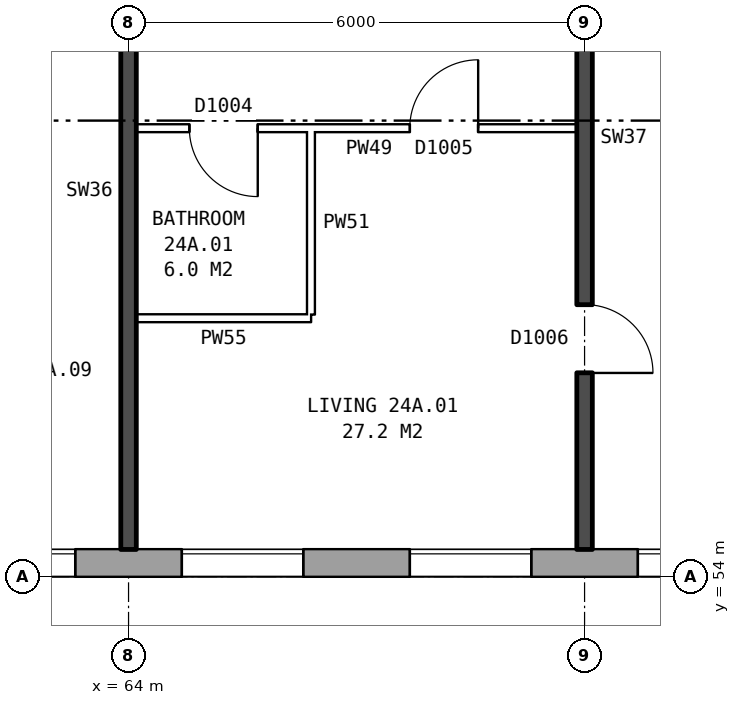
"""IFC4 building model, lengths in metres.
Left out: names, types, materials, properties, quantities, classifications, styles, units other than length and angle.
Written with IfcOpenShell. Run it as: python <this file> out.ifc"""

import sys

from ifc_helpers import new_model, si_unit, direction, frame, frame_2d, origin, place, context, subcontext, project, spatial, rectangle, extrude, element, fill, save


model = new_model("IFC4")
c1 = context("Model", 3, precision=1e-05, world=origin(), true_north=direction((0.0, 1.0)))
c2 = subcontext(c1, "Body", "Model", "MODEL_VIEW")
j1 = project(units=[si_unit("LENGTHUNIT", "METRE"), si_unit("PLANEANGLEUNIT", "RADIAN")], contexts=[c1])
p1 = place(None, origin())
s1 = spatial("IfcSite", under=j1, at=p1, CompositionType="ELEMENT")
p2 = place(p1, origin())
s2 = spatial("IfcBuilding", under=s1, at=p2, CompositionType="ELEMENT")
p3 = place(p2, frame((0.0, 0.0, 87.1)))
s3 = spatial("IfcBuildingStorey", under=s2, at=p3, CompositionType="ELEMENT", Elevation=87.1)
p4 = place(p3, frame((26.325, 54.18, 0.0), z_axis=(0.0, 0.0, 1.0), x_axis=(1.0, 0.0, 0.0)))
e1 = element("IfcWall", 1, at=p4, inside=s3, PredefinedType="STANDARD", context=c2, shape_type="SweptSolid", body=[
    extrude(rectangle(XDim=46.601, YDim=0.36, at=frame_2d((23.3, 0.0))), origin(), (0.0, 0.0, 1.0), 2.85),
])
p5 = place(p4, frame((2.375, 0.0, 0.8)))
e2 = element("IfcOpeningElement", 2, at=p5, cuts=e1, PredefinedType="OPENING", context=c2, shape_type="SweptSolid", body=[
    extrude(rectangle(XDim=1.6, YDim=1.8, at=frame_2d((0.8, 0.9))), frame((0.0, 0.19, 0.0), z_axis=(0.0, -1.0, 0.0), x_axis=(1.0, 0.0, 0.0)), (0.0, 0.0, 1.0), 0.38),
])
p6 = place(p4, frame((5.375, 0.0, 0.8)))
e3 = element("IfcOpeningElement", 3, at=p6, cuts=e1, PredefinedType="OPENING", context=c2, shape_type="SweptSolid", body=[
    extrude(rectangle(XDim=1.6, YDim=1.8, at=frame_2d((0.8, 0.9))), frame((0.0, 0.19, 0.0), z_axis=(0.0, -1.0, 0.0), x_axis=(1.0, 0.0, 0.0)), (0.0, 0.0, 1.0), 0.38),
])
p7 = place(p4, frame((8.375, 0.0, 0.8)))
e4 = element("IfcOpeningElement", 4, at=p7, cuts=e1, PredefinedType="OPENING", context=c2, shape_type="SweptSolid", body=[
    extrude(rectangle(XDim=1.6, YDim=1.8, at=frame_2d((0.8, 0.9))), frame((0.0, 0.19, 0.0), z_axis=(0.0, -1.0, 0.0), x_axis=(1.0, 0.0, 0.0)), (0.0, 0.0, 1.0), 0.38),
])
p8 = place(p4, frame((11.375, 0.0, 0.8)))
e5 = element("IfcOpeningElement", 5, at=p8, cuts=e1, PredefinedType="OPENING", context=c2, shape_type="SweptSolid", body=[
    extrude(rectangle(XDim=1.6, YDim=1.8, at=frame_2d((0.8, 0.9))), frame((0.0, 0.19, 0.0), z_axis=(0.0, -1.0, 0.0), x_axis=(1.0, 0.0, 0.0)), (0.0, 0.0, 1.0), 0.38),
])
p9 = place(p4, frame((14.375, 0.0, 0.8)))
e6 = element("IfcOpeningElement", 6, at=p9, cuts=e1, PredefinedType="OPENING", context=c2, shape_type="SweptSolid", body=[
    extrude(rectangle(XDim=1.6, YDim=1.8, at=frame_2d((0.8, 0.9))), frame((0.0, 0.19, 0.0), z_axis=(0.0, -1.0, 0.0), x_axis=(1.0, 0.0, 0.0)), (0.0, 0.0, 1.0), 0.38),
])
p10 = place(p4, frame((17.375, 0.0, 0.8)))
e7 = element("IfcOpeningElement", 7, at=p10, cuts=e1, PredefinedType="OPENING", context=c2, shape_type="SweptSolid", body=[
    extrude(rectangle(XDim=1.6, YDim=1.8, at=frame_2d((0.8, 0.9))), frame((0.0, 0.19, 0.0), z_axis=(0.0, -1.0, 0.0), x_axis=(1.0, 0.0, 0.0)), (0.0, 0.0, 1.0), 0.38),
])
p11 = place(p4, frame((19.875, 0.0, 1.4)))
e8 = element("IfcOpeningElement", 8, at=p11, cuts=e1, PredefinedType="OPENING", context=c2, shape_type="SweptSolid", body=[
    extrude(rectangle(XDim=1.2, YDim=1.2, at=frame_2d((0.6, 0.6))), frame((0.0, 0.19, 0.0), z_axis=(0.0, -1.0, 0.0), x_axis=(1.0, 0.0, 0.0)), (0.0, 0.0, 1.0), 0.38),
])
p12 = place(p4, frame((22.825, 0.0, 0.25)))
e9 = element("IfcOpeningElement", 9, at=p12, cuts=e1, PredefinedType="OPENING", context=c2, shape_type="SweptSolid", body=[
    extrude(rectangle(XDim=0.8, YDim=1.5, at=frame_2d((0.4, 0.75))), frame((0.0, 0.19, 0.0), z_axis=(0.0, -1.0, 0.0), x_axis=(1.0, 0.0, 0.0)), (0.0, 0.0, 1.0), 0.38),
])
p13 = place(p4, frame((26.375, 0.0, 0.8)))
e10 = element("IfcOpeningElement", 10, at=p13, cuts=e1, PredefinedType="OPENING", context=c2, shape_type="SweptSolid", body=[
    extrude(rectangle(XDim=1.6, YDim=1.8, at=frame_2d((0.8, 0.9))), frame((0.0, 0.19, 0.0), z_axis=(0.0, -1.0, 0.0), x_axis=(1.0, 0.0, 0.0)), (0.0, 0.0, 1.0), 0.38),
])
p14 = place(p4, frame((29.375, 0.0, 0.8)))
e11 = element("IfcOpeningElement", 11, at=p14, cuts=e1, PredefinedType="OPENING", context=c2, shape_type="SweptSolid", body=[
    extrude(rectangle(XDim=1.6, YDim=1.8, at=frame_2d((0.8, 0.9))), frame((0.0, 0.19, 0.0), z_axis=(0.0, -1.0, 0.0), x_axis=(1.0, 0.0, 0.0)), (0.0, 0.0, 1.0), 0.38),
])
p15 = place(p4, frame((32.375, 0.0, 0.8)))
e12 = element("IfcOpeningElement", 12, at=p15, cuts=e1, PredefinedType="OPENING", context=c2, shape_type="SweptSolid", body=[
    extrude(rectangle(XDim=1.6, YDim=1.8, at=frame_2d((0.8, 0.9))), frame((0.0, 0.19, 0.0), z_axis=(0.0, -1.0, 0.0), x_axis=(1.0, 0.0, 0.0)), (0.0, 0.0, 1.0), 0.38),
])
p16 = place(p4, frame((35.375, 0.0, 0.8)))
e13 = element("IfcOpeningElement", 13, at=p16, cuts=e1, PredefinedType="OPENING", context=c2, shape_type="SweptSolid", body=[
    extrude(rectangle(XDim=1.6, YDim=1.8, at=frame_2d((0.8, 0.9))), frame((0.0, 0.19, 0.0), z_axis=(0.0, -1.0, 0.0), x_axis=(1.0, 0.0, 0.0)), (0.0, 0.0, 1.0), 0.38),
])
p17 = place(p4, frame((38.375, 0.0, 0.8)))
e14 = element("IfcOpeningElement", 14, at=p17, cuts=e1, PredefinedType="OPENING", context=c2, shape_type="SweptSolid", body=[
    extrude(rectangle(XDim=1.6, YDim=1.8, at=frame_2d((0.8, 0.9))), frame((0.0, 0.19, 0.0), z_axis=(0.0, -1.0, 0.0), x_axis=(1.0, 0.0, 0.0)), (0.0, 0.0, 1.0), 0.38),
])
p18 = place(p4, frame((41.375, 0.0, 0.8)))
e15 = element("IfcOpeningElement", 15, at=p18, cuts=e1, PredefinedType="OPENING", context=c2, shape_type="SweptSolid", body=[
    extrude(rectangle(XDim=1.6, YDim=1.8, at=frame_2d((0.8, 0.9))), frame((0.0, 0.19, 0.0), z_axis=(0.0, -1.0, 0.0), x_axis=(1.0, 0.0, 0.0)), (0.0, 0.0, 1.0), 0.38),
])
p19 = place(p4, frame((44.375, 0.0, 0.8)))
e16 = element("IfcOpeningElement", 16, at=p19, cuts=e1, PredefinedType="OPENING", context=c2, shape_type="SweptSolid", body=[
    extrude(rectangle(XDim=1.6, YDim=1.8, at=frame_2d((0.8, 0.9))), frame((0.0, 0.19, 0.0), z_axis=(0.0, -1.0, 0.0), x_axis=(1.0, 0.0, 0.0)), (0.0, 0.0, 1.0), 0.38),
])
p20 = place(p4, frame((23.925, 0.0, 0.15)))
e17 = element("IfcOpeningElement", 17, at=p20, cuts=e1, PredefinedType="OPENING", context=c2, shape_type="SweptSolid", body=[
    extrude(rectangle(XDim=0.6, YDim=0.9, at=frame_2d((0.3, 0.45))), frame((0.0, 0.19, 0.0), z_axis=(0.0, -1.0, 0.0), x_axis=(1.0, 0.0, 0.0)), (0.0, 0.0, 1.0), 0.38),
])
p21 = place(p3, frame((64.1, 57.4, 0.0), z_axis=(0.0, 0.0, 1.0), x_axis=(1.0, 0.0, 0.0)))
e18 = element("IfcWall", 18, at=p21, inside=s3, PredefinedType="PARTITIONING", context=c2, shape_type="SweptSolid", body=[
    extrude(rectangle(XDim=2.3, YDim=0.1, at=frame_2d((1.15, 0.0))), origin(), (0.0, 0.0, 1.0), 2.85),
])
p22 = place(p3, frame((64.1, 59.9, 0.0), z_axis=(0.0, 0.0, 1.0), x_axis=(1.0, 0.0, 0.0)))
e19 = element("IfcWall", 19, at=p22, inside=s3, PredefinedType="PARTITIONING", context=c2, shape_type="SweptSolid", body=[
    extrude(rectangle(XDim=5.8, YDim=0.1, at=frame_2d((2.9, 0.0))), origin(), (0.0, 0.0, 1.0), 2.85),
])
p23 = place(p22, frame((3.6, 0.0, 0.0)))
e20 = element("IfcOpeningElement", 20, at=p23, cuts=e19, PredefinedType="OPENING", context=c2, shape_type="SweptSolid", body=[
    extrude(rectangle(XDim=0.9, YDim=2.1, at=frame_2d((0.45, 1.05))), frame((0.0, 0.06, 0.0), z_axis=(0.0, -1.0, 0.0), x_axis=(1.0, 0.0, 0.0)), (0.0, 0.0, 1.0), 0.12),
])
p24 = place(p22, frame((0.7, 0.0, 0.0)))
e21 = element("IfcOpeningElement", 21, at=p24, cuts=e19, PredefinedType="OPENING", context=c2, shape_type="SweptSolid", body=[
    extrude(rectangle(XDim=0.9, YDim=2.1, at=frame_2d((0.45, 1.05))), frame((0.0, 0.06, 0.0), z_axis=(0.0, -1.0, 0.0), x_axis=(1.0, 0.0, 0.0)), (0.0, 0.0, 1.0), 0.12),
])
p25 = place(p3, frame((64.0, 54.36, 0.0), z_axis=(0.0, 0.0, 1.0), x_axis=(0.0, 1.0, 0.0)))
e22 = element("IfcWall", 22, at=p25, inside=s3, PredefinedType="SOLIDWALL", context=c2, shape_type="SweptSolid", body=[
    extrude(rectangle(XDim=9.44, YDim=0.2, at=frame_2d((4.72, 0.0))), origin(), (0.0, 0.0, 1.0), 2.85),
])
p26 = place(p3, frame((66.4, 57.45, 0.0), z_axis=(0.0, 0.0, 1.0), x_axis=(0.0, 1.0, 0.0)))
e23 = element("IfcWall", 23, at=p26, inside=s3, PredefinedType="PARTITIONING", context=c2, shape_type="SweptSolid", body=[
    extrude(rectangle(XDim=2.4, YDim=0.1, at=frame_2d((1.2, 0.0))), origin(), (0.0, 0.0, 1.0), 2.85),
])
p27 = place(p3, frame((70.0, 54.36, 0.0), z_axis=(0.0, 0.0, 1.0), x_axis=(0.0, 1.0, 0.0)))
e24 = element("IfcWall", 24, at=p27, inside=s3, PredefinedType="SOLIDWALL", context=c2, shape_type="SweptSolid", body=[
    extrude(rectangle(XDim=9.44, YDim=0.2, at=frame_2d((4.72, 0.0))), origin(), (0.0, 0.0, 1.0), 2.85),
])
p28 = place(p27, frame((2.32, 0.0, 0.0)))
e25 = element("IfcOpeningElement", 25, at=p28, cuts=e24, PredefinedType="OPENING", context=c2, shape_type="SweptSolid", body=[
    extrude(rectangle(XDim=0.9, YDim=2.1, at=frame_2d((0.45, 1.05))), frame((0.0, 0.11, 0.0), z_axis=(0.0, -1.0, 0.0), x_axis=(1.0, 0.0, 0.0)), (0.0, 0.0, 1.0), 0.22),
])
p29 = place(p27, frame((7.59, 0.0, 0.0)))
e26 = element("IfcOpeningElement", 26, at=p29, cuts=e24, PredefinedType="OPENING", context=c2, shape_type="SweptSolid", body=[
    extrude(rectangle(XDim=0.9, YDim=2.1, at=frame_2d((0.45, 1.05))), frame((0.0, 0.11, 0.0), z_axis=(0.0, -1.0, 0.0), x_axis=(1.0, 0.0, 0.0)), (0.0, 0.0, 1.0), 0.22),
])
p30 = place(p16, origin())
e27 = element("IfcWindow", 27, at=p30, inside=s3, PartitioningType="SINGLE_PANEL", PredefinedType="WINDOW", context=c2, shape_type="SweptSolid", body=[
    extrude(rectangle(XDim=1.6, YDim=1.8, at=frame_2d((0.8, 0.9))), frame((0.0, 0.15, 0.0), z_axis=(0.0, -1.0, 0.0), x_axis=(1.0, 0.0, 0.0)), (0.0, 0.0, 1.0), 0.06),
])
fill(e13, e27)
p31 = place(p17, origin())
e28 = element("IfcWindow", 28, at=p31, inside=s3, PartitioningType="SINGLE_PANEL", PredefinedType="WINDOW", context=c2, shape_type="SweptSolid", body=[
    extrude(rectangle(XDim=1.6, YDim=1.8, at=frame_2d((0.8, 0.9))), frame((0.0, 0.15, 0.0), z_axis=(0.0, -1.0, 0.0), x_axis=(1.0, 0.0, 0.0)), (0.0, 0.0, 1.0), 0.06),
])
fill(e14, e28)
p32 = place(p18, origin())
e29 = element("IfcWindow", 29, at=p32, inside=s3, PartitioningType="SINGLE_PANEL", PredefinedType="WINDOW", context=c2, shape_type="SweptSolid", body=[
    extrude(rectangle(XDim=1.6, YDim=1.8, at=frame_2d((0.8, 0.9))), frame((0.0, 0.15, 0.0), z_axis=(0.0, -1.0, 0.0), x_axis=(1.0, 0.0, 0.0)), (0.0, 0.0, 1.0), 0.06),
])
fill(e15, e29)
p33 = place(p19, origin())
e30 = element("IfcWindow", 30, at=p33, inside=s3, PartitioningType="SINGLE_PANEL", PredefinedType="WINDOW", context=c2, shape_type="SweptSolid", body=[
    extrude(rectangle(XDim=1.6, YDim=1.8, at=frame_2d((0.8, 0.9))), frame((0.0, 0.15, 0.0), z_axis=(0.0, -1.0, 0.0), x_axis=(1.0, 0.0, 0.0)), (0.0, 0.0, 1.0), 0.06),
])
fill(e16, e30)
p34 = place(p28, frame((0.9, 0.0, 0.0), z_axis=(0.0, 0.0, 1.0), x_axis=(-1.0, 0.0, 0.0)))
e31 = element("IfcDoor", 31, at=p34, inside=s3, OperationType="SINGLE_SWING_RIGHT", PredefinedType="DOOR", context=c2, shape_type="SweptSolid", body=[
    extrude(rectangle(XDim=0.9, YDim=2.1, at=frame_2d((0.45, 1.05))), frame((0.0, 0.025, 0.0), z_axis=(0.0, -1.0, 0.0), x_axis=(1.0, 0.0, 0.0)), (0.0, 0.0, 1.0), 0.05),
])
fill(e25, e31)
p35 = place(p23, origin())
e32 = element("IfcDoor", 32, at=p35, inside=s3, OperationType="SINGLE_SWING_RIGHT", PredefinedType="DOOR", context=c2, shape_type="SweptSolid", body=[
    extrude(rectangle(XDim=0.9, YDim=2.1, at=frame_2d((0.45, 1.05))), frame((0.0, 0.025, 0.0), z_axis=(0.0, -1.0, 0.0), x_axis=(1.0, 0.0, 0.0)), (0.0, 0.0, 1.0), 0.05),
])
fill(e20, e32)
p36 = place(p24, frame((0.9, 0.0, 0.0), z_axis=(0.0, 0.0, 1.0), x_axis=(-1.0, 0.0, 0.0)))
e33 = element("IfcDoor", 33, at=p36, inside=s3, OperationType="SINGLE_SWING_LEFT", PredefinedType="DOOR", context=c2, shape_type="SweptSolid", body=[
    extrude(rectangle(XDim=0.9, YDim=2.1, at=frame_2d((0.45, 1.05))), frame((0.0, 0.025, 0.0), z_axis=(0.0, -1.0, 0.0), x_axis=(1.0, 0.0, 0.0)), (0.0, 0.0, 1.0), 0.05),
])
fill(e21, e33)
save(model, sys.argv[1])
